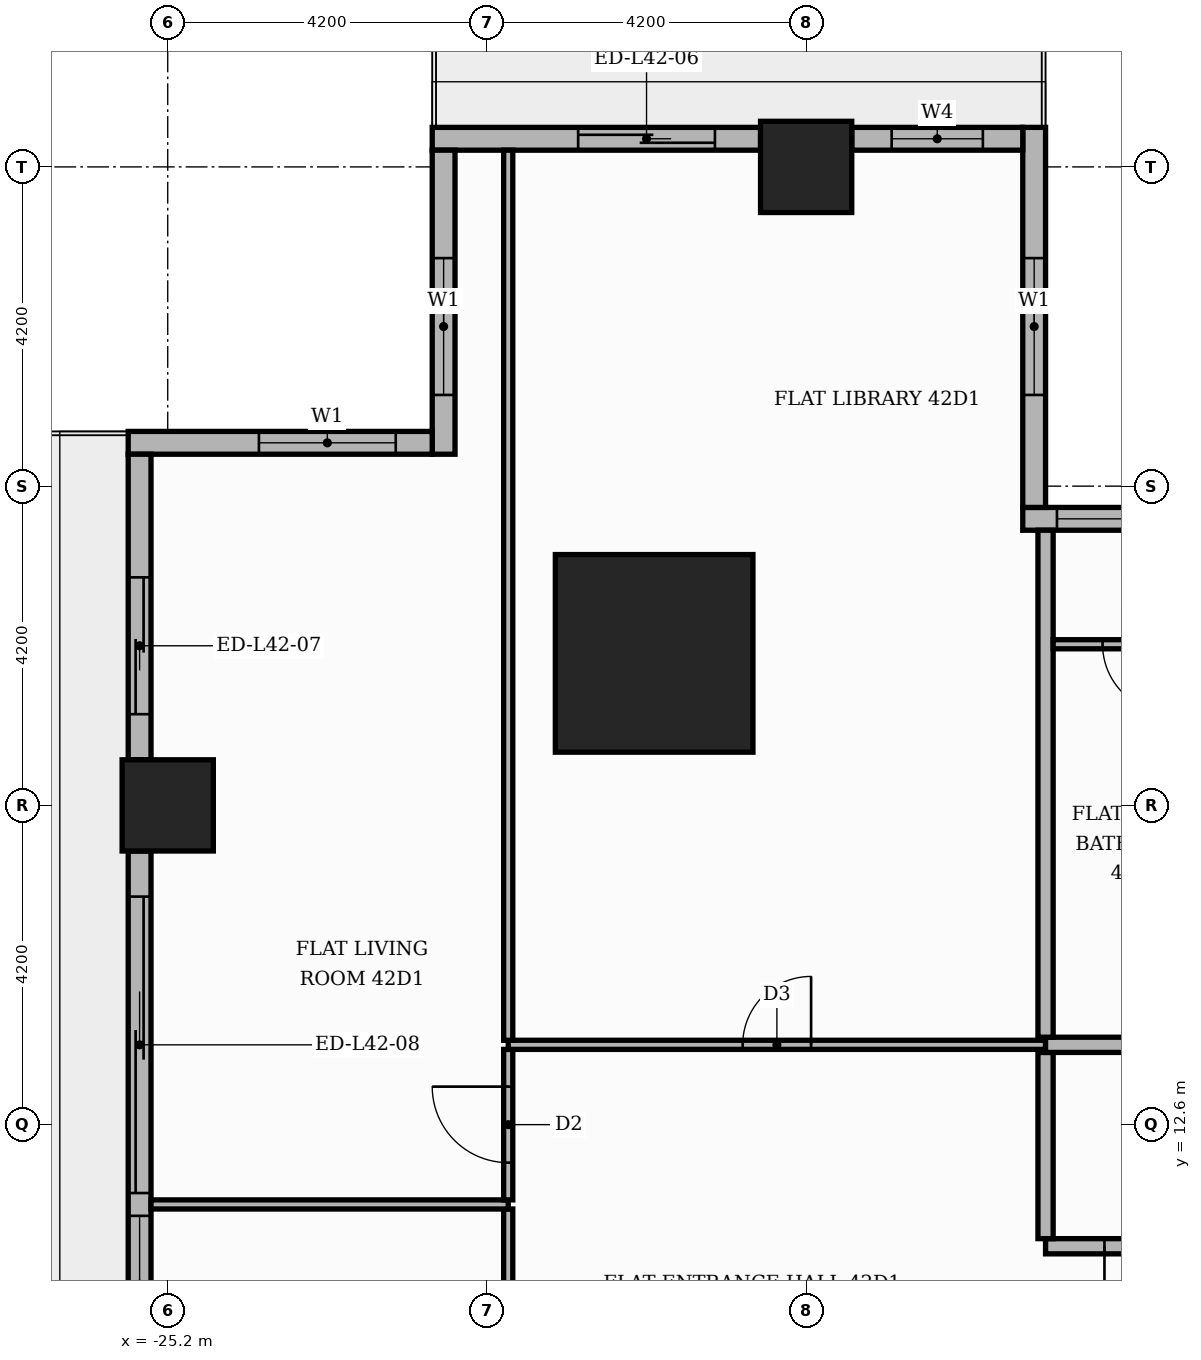
"""IFC4 building model, lengths in metres.
Left out: names, types, materials, properties, quantities, classifications, styles, units other than length and angle.
Written with IfcOpenShell. Run it as: python <this file> out.ifc"""

import sys

from ifc_helpers import new_model, si_unit, direction, frame, frame_2d, origin, origin_2d, place, context, subcontext, project, spatial, rectangle, extrude, element, fill, save


model = new_model("IFC4")
c1 = context("Model", 3, precision=1e-05, world=origin(), true_north=direction((0.0, 1.0)))
c2 = subcontext(c1, "Body", "Model", "MODEL_VIEW")
j1 = project(units=[si_unit("LENGTHUNIT", "METRE"), si_unit("PLANEANGLEUNIT", "RADIAN")], contexts=[c1])
p1 = place(None, origin())
s1 = spatial("IfcSite", under=j1, at=p1, CompositionType="ELEMENT")
p2 = place(p1, origin())
s2 = spatial("IfcBuilding", under=s1, at=p2, CompositionType="ELEMENT")
p3 = place(p2, frame((0.0, 0.0, 176.7)))
s3 = spatial("IfcBuildingStorey", under=s2, at=p3, CompositionType="ELEMENT", Elevation=176.7)
p4 = place(p3, frame((-18.8, 18.8, 0.0), z_axis=(0.0, 0.0, 1.0), x_axis=(1.0, 0.0, 0.0)))
e1 = element("IfcColumn", 1, at=p4, inside=s3, PredefinedType="COLUMN", context=c2, shape_type="SweptSolid", body=[
    extrude(rectangle(XDim=2.6, YDim=2.6, at=origin_2d()), origin(), (0.0, 0.0, 1.0), 3.9),
])
for number, where, z_axis, x_axis in (
    (2, (-16.8, 25.2, 0.0), (0.0, 0.0, 1.0), (1.0, 0.0, 0.0)),
    (3, (-25.2, 16.8, 0.0), (0.0, 0.0, 1.0), (1.0, 0.0, 0.0)),
):
    element("IfcColumn", number, at=place(p3, frame(where, z_axis=z_axis, x_axis=x_axis)), inside=s3, PredefinedType="COLUMN", context=c2, shape_type="SweptSolid", body=[
        extrude(rectangle(XDim=1.2, YDim=1.2, at=origin_2d()), origin(), (0.0, 0.0, 1.0), 3.9),
    ])
p5 = place(p3, frame((13.65, 20.57, 0.0), z_axis=(0.0, 0.0, 1.0), x_axis=(-1.0, 0.0, 0.0)))
e4 = element("IfcWall", 4, at=p5, inside=s3, PredefinedType="STANDARD", context=c2, shape_type="SweptSolid", body=[
    extrude(rectangle(XDim=27.6, YDim=0.3, at=frame_2d((13.8, 0.0))), origin(), (0.0, 0.0, 1.0), 3.4),
])
p6 = place(p5, frame((0.15, 0.0, 0.9)))
e5 = element("IfcOpeningElement", 5, at=p6, cuts=e4, PredefinedType="OPENING", context=c2, shape_type="SweptSolid", body=[
    extrude(rectangle(XDim=1.8, YDim=2.1, at=frame_2d((0.9, 1.05))), frame((0.0, 0.16, 0.0), z_axis=(0.0, -1.0, 0.0), x_axis=(1.0, 0.0, 0.0)), (0.0, 0.0, 1.0), 0.32),
])
p7 = place(p5, frame((2.25, 0.0, 0.9)))
e6 = element("IfcOpeningElement", 6, at=p7, cuts=e4, PredefinedType="OPENING", context=c2, shape_type="SweptSolid", body=[
    extrude(rectangle(XDim=6.0, YDim=2.1, at=frame_2d((3.0, 1.05))), frame((0.0, 0.16, 0.0), z_axis=(0.0, -1.0, 0.0), x_axis=(1.0, 0.0, 0.0)), (0.0, 0.0, 1.0), 0.32),
])
p8 = place(p5, frame((8.55, 0.0, 0.9)))
e7 = element("IfcOpeningElement", 7, at=p8, cuts=e4, PredefinedType="OPENING", context=c2, shape_type="SweptSolid", body=[
    extrude(rectangle(XDim=6.0, YDim=2.1, at=frame_2d((3.0, 1.05))), frame((0.0, 0.16, 0.0), z_axis=(0.0, -1.0, 0.0), x_axis=(1.0, 0.0, 0.0)), (0.0, 0.0, 1.0), 0.32),
])
p9 = place(p5, frame((14.85, 0.0, 0.9)))
e8 = element("IfcOpeningElement", 8, at=p9, cuts=e4, PredefinedType="OPENING", context=c2, shape_type="SweptSolid", body=[
    extrude(rectangle(XDim=6.0, YDim=2.1, at=frame_2d((3.0, 1.05))), frame((0.0, 0.16, 0.0), z_axis=(0.0, -1.0, 0.0), x_axis=(1.0, 0.0, 0.0)), (0.0, 0.0, 1.0), 0.32),
])
p10 = place(p5, frame((21.15, 0.0, 0.9)))
e9 = element("IfcOpeningElement", 9, at=p10, cuts=e4, PredefinedType="OPENING", context=c2, shape_type="SweptSolid", body=[
    extrude(rectangle(XDim=6.0, YDim=2.1, at=frame_2d((3.0, 1.05))), frame((0.0, 0.16, 0.0), z_axis=(0.0, -1.0, 0.0), x_axis=(1.0, 0.0, 0.0)), (0.0, 0.0, 1.0), 0.32),
])
p11 = place(p3, frame((-13.8, 20.72, 0.0), z_axis=(0.0, 0.0, 1.0), x_axis=(0.0, 1.0, 0.0)))
e10 = element("IfcWall", 10, at=p11, inside=s3, PredefinedType="STANDARD", context=c2, shape_type="SweptSolid", body=[
    extrude(rectangle(XDim=5.0, YDim=0.3, at=frame_2d((2.5, 0.0))), origin(), (0.0, 0.0, 1.0), 3.4),
])
p12 = place(p11, frame((1.48, 0.0, 0.9)))
e11 = element("IfcOpeningElement", 11, at=p12, cuts=e10, PredefinedType="OPENING", context=c2, shape_type="SweptSolid", body=[
    extrude(rectangle(XDim=1.8, YDim=2.1, at=frame_2d((0.9, 1.05))), frame((0.0, 0.16, 0.0), z_axis=(0.0, -1.0, 0.0), x_axis=(1.0, 0.0, 0.0)), (0.0, 0.0, 1.0), 0.32),
])
p13 = place(p3, frame((-13.95, 25.57, 0.0), z_axis=(0.0, 0.0, 1.0), x_axis=(-1.0, 0.0, 0.0)))
e12 = element("IfcWall", 12, at=p13, inside=s3, PredefinedType="STANDARD", context=c2, shape_type="SweptSolid", body=[
    extrude(rectangle(XDim=2.25, YDim=0.3, at=frame_2d((1.125, 0.0))), origin(), (0.0, 0.0, 1.0), 3.4),
])
p14 = place(p13, frame((0.525, 0.0, 0.9)))
e13 = element("IfcOpeningElement", 13, at=p14, cuts=e12, PredefinedType="OPENING", context=c2, shape_type="SweptSolid", body=[
    extrude(rectangle(XDim=1.2, YDim=2.1, at=frame_2d((0.6, 1.05))), frame((0.0, 0.16, 0.0), z_axis=(0.0, -1.0, 0.0), x_axis=(1.0, 0.0, 0.0)), (0.0, 0.0, 1.0), 0.32),
])
p15 = place(p3, frame((-17.4, 25.57, 0.0), z_axis=(0.0, 0.0, 1.0), x_axis=(-1.0, 0.0, 0.0)))
e14 = element("IfcWall", 14, at=p15, inside=s3, PredefinedType="STANDARD", context=c2, shape_type="SweptSolid", body=[
    extrude(rectangle(XDim=4.32, YDim=0.3, at=frame_2d((2.16, 0.0))), origin(), (0.0, 0.0, 1.0), 3.4),
])
p16 = place(p15, frame((0.6, 0.0, 0.0)))
e15 = element("IfcOpeningElement", 15, at=p16, cuts=e14, PredefinedType="OPENING", context=c2, shape_type="SweptSolid", body=[
    extrude(rectangle(XDim=1.8, YDim=2.4, at=frame_2d((0.9, 1.2))), frame((0.0, 0.16, 0.0), z_axis=(0.0, -1.0, 0.0), x_axis=(1.0, 0.0, 0.0)), (0.0, 0.0, 1.0), 0.32),
])
p17 = place(p3, frame((-21.57, 25.42, 0.0), z_axis=(0.0, 0.0, 1.0), x_axis=(0.0, -1.0, 0.0)))
e16 = element("IfcWall", 16, at=p17, inside=s3, PredefinedType="STANDARD", context=c2, shape_type="SweptSolid", body=[
    extrude(rectangle(XDim=4.0, YDim=0.3, at=frame_2d((2.0, 0.0))), origin(), (0.0, 0.0, 1.0), 3.4),
])
p18 = place(p17, frame((1.42, 0.0, 0.9)))
e17 = element("IfcOpeningElement", 17, at=p18, cuts=e16, PredefinedType="OPENING", context=c2, shape_type="SweptSolid", body=[
    extrude(rectangle(XDim=1.8, YDim=2.1, at=frame_2d((0.9, 1.05))), frame((0.0, 0.16, 0.0), z_axis=(0.0, -1.0, 0.0), x_axis=(1.0, 0.0, 0.0)), (0.0, 0.0, 1.0), 0.32),
])
p19 = place(p3, frame((-21.72, 21.57, 0.0), z_axis=(0.0, 0.0, 1.0), x_axis=(-1.0, 0.0, 0.0)))
e18 = element("IfcWall", 18, at=p19, inside=s3, PredefinedType="STANDARD", context=c2, shape_type="SweptSolid", body=[
    extrude(rectangle(XDim=4.0, YDim=0.3, at=frame_2d((2.0, 0.0))), origin(), (0.0, 0.0, 1.0), 3.4),
])
p20 = place(p19, frame((0.48, 0.0, 0.9)))
e19 = element("IfcOpeningElement", 19, at=p20, cuts=e18, PredefinedType="OPENING", context=c2, shape_type="SweptSolid", body=[
    extrude(rectangle(XDim=1.8, YDim=2.1, at=frame_2d((0.9, 1.05))), frame((0.0, 0.16, 0.0), z_axis=(0.0, -1.0, 0.0), x_axis=(1.0, 0.0, 0.0)), (0.0, 0.0, 1.0), 0.32),
])
p21 = place(p3, frame((-25.57, 21.42, 0.0), z_axis=(0.0, 0.0, 1.0), x_axis=(0.0, -1.0, 0.0)))
e20 = element("IfcWall", 20, at=p21, inside=s3, PredefinedType="STANDARD", context=c2, shape_type="SweptSolid", body=[
    extrude(rectangle(XDim=4.02, YDim=0.3, at=frame_2d((2.01, 0.0))), origin(), (0.0, 0.0, 1.0), 3.4),
])
p22 = place(p21, frame((1.62, 0.0, 0.0)))
e21 = element("IfcOpeningElement", 21, at=p22, cuts=e20, PredefinedType="OPENING", context=c2, shape_type="SweptSolid", body=[
    extrude(rectangle(XDim=1.8, YDim=2.4, at=frame_2d((0.9, 1.2))), frame((0.0, 0.16, 0.0), z_axis=(0.0, -1.0, 0.0), x_axis=(1.0, 0.0, 0.0)), (0.0, 0.0, 1.0), 0.32),
])
p23 = place(p3, frame((-25.57, 16.2, 0.0), z_axis=(0.0, 0.0, 1.0), x_axis=(0.0, -1.0, 0.0)))
e22 = element("IfcWall", 22, at=p23, inside=s3, PredefinedType="STANDARD", context=c2, shape_type="SweptSolid", body=[
    extrude(rectangle(XDim=7.2, YDim=0.3, at=frame_2d((3.6, 0.0))), origin(), (0.0, 0.0, 1.0), 3.4),
])
p24 = place(p23, frame((0.6, 0.0, 0.0)))
e23 = element("IfcOpeningElement", 23, at=p24, cuts=e22, PredefinedType="OPENING", context=c2, shape_type="SweptSolid", body=[
    extrude(rectangle(XDim=3.9, YDim=2.4, at=frame_2d((1.95, 1.2))), frame((0.0, 0.16, 0.0), z_axis=(0.0, -1.0, 0.0), x_axis=(1.0, 0.0, 0.0)), (0.0, 0.0, 1.0), 0.32),
])
p25 = place(p23, frame((4.8, 0.0, 0.9)))
e24 = element("IfcOpeningElement", 24, at=p25, cuts=e22, PredefinedType="OPENING", context=c2, shape_type="SweptSolid", body=[
    extrude(rectangle(XDim=1.8, YDim=2.1, at=frame_2d((0.9, 1.05))), frame((0.0, 0.16, 0.0), z_axis=(0.0, -1.0, 0.0), x_axis=(1.0, 0.0, 0.0)), (0.0, 0.0, 1.0), 0.32),
])
p26 = place(p3, frame((-20.72, 7.41, 0.0), z_axis=(0.0, 0.0, 1.0), x_axis=(0.0, 1.0, 0.0)))
e25 = element("IfcWall", 25, at=p26, inside=s3, PredefinedType="PARTITIONING", context=c2, shape_type="SweptSolid", body=[
    extrude(rectangle(XDim=4.08, YDim=0.12, at=frame_2d((2.04, 0.0))), origin(), (0.0, 0.0, 1.0), 3.4),
])
p27 = place(p26, frame((1.59, 0.0, 0.0)))
e26 = element("IfcOpeningElement", 26, at=p27, cuts=e25, PredefinedType="OPENING", context=c2, shape_type="SweptSolid", body=[
    extrude(rectangle(XDim=0.9, YDim=2.1, at=frame_2d((0.45, 1.05))), frame((0.0, 0.07, 0.0), z_axis=(0.0, -1.0, 0.0), x_axis=(1.0, 0.0, 0.0)), (0.0, 0.0, 1.0), 0.14),
])
p28 = place(p3, frame((-13.65, 11.0, 0.0), z_axis=(0.0, 0.0, 1.0), x_axis=(1.0, 0.0, 0.0)))
e27 = element("IfcWall", 27, at=p28, inside=s3, PredefinedType="PARTITIONING", context=c2, shape_type="SweptSolid", body=[
    extrude(rectangle(XDim=2.65, YDim=0.2, at=frame_2d((1.325, 0.0))), origin(), (0.0, 0.0, 1.0), 3.4),
])
p29 = place(p28, frame((0.775, 0.0, 0.0)))
e28 = element("IfcOpeningElement", 28, at=p29, cuts=e27, PredefinedType="OPENING", context=c2, shape_type="SweptSolid", body=[
    extrude(rectangle(XDim=1.1, YDim=2.4, at=frame_2d((0.55, 1.2))), frame((0.0, 0.11, 0.0), z_axis=(0.0, -1.0, 0.0), x_axis=(1.0, 0.0, 0.0)), (0.0, 0.0, 1.0), 0.22),
])
p30 = place(p3, frame((-13.65, 11.1, 0.0), z_axis=(0.0, 0.0, 1.0), x_axis=(0.0, 1.0, 0.0)))
e29 = element("IfcWall", 29, at=p30, inside=s3, PredefinedType="PARTITIONING", context=c2, shape_type="SweptSolid", body=[
    extrude(rectangle(XDim=2.45, YDim=0.2, at=frame_2d((1.225, 0.0))), origin(), (0.0, 0.0, 1.0), 3.4),
])
p31 = place(p3, frame((-25.42, 11.55, 0.0), z_axis=(0.0, 0.0, 1.0), x_axis=(1.0, 0.0, 0.0)))
e30 = element("IfcWall", 30, at=p31, inside=s3, PredefinedType="PARTITIONING", context=c2, shape_type="SweptSolid", body=[
    extrude(rectangle(XDim=4.7, YDim=0.12, at=frame_2d((2.35, 0.0))), origin(), (0.0, 0.0, 1.0), 3.4),
])
p32 = place(p3, frame((-20.72, 11.61, 0.0), z_axis=(0.0, 0.0, 1.0), x_axis=(0.0, 1.0, 0.0)))
e31 = element("IfcWall", 31, at=p32, inside=s3, PredefinedType="PARTITIONING", context=c2, shape_type="SweptSolid", body=[
    extrude(rectangle(XDim=1.98, YDim=0.12, at=frame_2d((0.99, 0.0))), origin(), (0.0, 0.0, 1.0), 3.4),
])
p33 = place(p32, frame((0.49, 0.0, 0.0)))
e32 = element("IfcOpeningElement", 32, at=p33, cuts=e31, PredefinedType="OPENING", context=c2, shape_type="SweptSolid", body=[
    extrude(rectangle(XDim=1.0, YDim=2.1, at=frame_2d((0.5, 1.05))), frame((0.0, 0.07, 0.0), z_axis=(0.0, -1.0, 0.0), x_axis=(1.0, 0.0, 0.0)), (0.0, 0.0, 1.0), 0.14),
])
p34 = place(p3, frame((-20.72, 13.65, 0.0), z_axis=(0.0, 0.0, 1.0), x_axis=(1.0, 0.0, 0.0)))
e33 = element("IfcWall", 33, at=p34, inside=s3, PredefinedType="PARTITIONING", context=c2, shape_type="SweptSolid", body=[
    extrude(rectangle(XDim=7.07, YDim=0.12, at=frame_2d((3.535, 0.0))), origin(), (0.0, 0.0, 1.0), 3.4),
])
p35 = place(p34, frame((3.085, 0.0, 0.0)))
e34 = element("IfcOpeningElement", 34, at=p35, cuts=e33, PredefinedType="OPENING", context=c2, shape_type="SweptSolid", body=[
    extrude(rectangle(XDim=0.9, YDim=2.1, at=frame_2d((0.45, 1.05))), frame((0.0, 0.07, 0.0), z_axis=(0.0, -1.0, 0.0), x_axis=(1.0, 0.0, 0.0)), (0.0, 0.0, 1.0), 0.14),
])
p36 = place(p3, frame((-13.65, 13.65, 0.0), z_axis=(0.0, 0.0, 1.0), x_axis=(1.0, 0.0, 0.0)))
e35 = element("IfcWall", 35, at=p36, inside=s3, PredefinedType="PARTITIONING", context=c2, shape_type="SweptSolid", body=[
    extrude(rectangle(XDim=39.07, YDim=0.2, at=frame_2d((19.535, 0.0))), origin(), (0.0, 0.0, 1.0), 3.4),
])
p37 = place(p36, frame((23.6, 0.0, 0.0)))
e36 = element("IfcOpeningElement", 36, at=p37, cuts=e35, PredefinedType="OPENING", context=c2, shape_type="SweptSolid", body=[
    extrude(rectangle(XDim=1.1, YDim=2.4, at=frame_2d((0.55, 1.2))), frame((0.0, 0.11, 0.0), z_axis=(0.0, -1.0, 0.0), x_axis=(1.0, 0.0, 0.0)), (0.0, 0.0, 1.0), 0.22),
])
p38 = place(p3, frame((-20.72, 13.71, 0.0), z_axis=(0.0, 0.0, 1.0), x_axis=(0.0, 1.0, 0.0)))
e37 = element("IfcWall", 37, at=p38, inside=s3, PredefinedType="PARTITIONING", context=c2, shape_type="SweptSolid", body=[
    extrude(rectangle(XDim=11.71, YDim=0.12, at=frame_2d((5.855, 0.0))), origin(), (0.0, 0.0, 1.0), 3.4),
])
p39 = place(p3, frame((-13.65, 13.75, 0.0), z_axis=(0.0, 0.0, 1.0), x_axis=(0.0, 1.0, 0.0)))
e38 = element("IfcWall", 38, at=p39, inside=s3, PredefinedType="PARTITIONING", context=c2, shape_type="SweptSolid", body=[
    extrude(rectangle(XDim=6.67, YDim=0.2, at=frame_2d((3.335, 0.0))), origin(), (0.0, 0.0, 1.0), 3.4),
])
p40 = place(p3, frame((-13.55, 18.92, 0.0), z_axis=(0.0, 0.0, 1.0), x_axis=(1.0, 0.0, 0.0)))
e39 = element("IfcWall", 39, at=p40, inside=s3, PredefinedType="PARTITIONING", context=c2, shape_type="SweptSolid", body=[
    extrude(rectangle(XDim=20.9, YDim=0.12, at=frame_2d((10.45, 0.0))), origin(), (0.0, 0.0, 1.0), 3.4),
])
p41 = place(p40, frame((17.15, 0.0, 0.0)))
e40 = element("IfcOpeningElement", 40, at=p41, cuts=e39, PredefinedType="OPENING", context=c2, shape_type="SweptSolid", body=[
    extrude(rectangle(XDim=0.9, YDim=2.1, at=frame_2d((0.45, 1.05))), frame((0.0, 0.07, 0.0), z_axis=(0.0, -1.0, 0.0), x_axis=(1.0, 0.0, 0.0)), (0.0, 0.0, 1.0), 0.14),
])
p42 = place(p40, frame((12.2, 0.0, 0.0)))
e41 = element("IfcOpeningElement", 41, at=p42, cuts=e39, PredefinedType="OPENING", context=c2, shape_type="SweptSolid", body=[
    extrude(rectangle(XDim=0.9, YDim=2.1, at=frame_2d((0.45, 1.05))), frame((0.0, 0.07, 0.0), z_axis=(0.0, -1.0, 0.0), x_axis=(1.0, 0.0, 0.0)), (0.0, 0.0, 1.0), 0.14),
])
p43 = place(p40, frame((7.1, 0.0, 0.0)))
e42 = element("IfcOpeningElement", 42, at=p43, cuts=e39, PredefinedType="OPENING", context=c2, shape_type="SweptSolid", body=[
    extrude(rectangle(XDim=0.9, YDim=2.1, at=frame_2d((0.45, 1.05))), frame((0.0, 0.07, 0.0), z_axis=(0.0, -1.0, 0.0), x_axis=(1.0, 0.0, 0.0)), (0.0, 0.0, 1.0), 0.14),
])
p44 = place(p40, frame((2.75, 0.0, 0.0)))
e43 = element("IfcOpeningElement", 43, at=p44, cuts=e39, PredefinedType="OPENING", context=c2, shape_type="SweptSolid", body=[
    extrude(rectangle(XDim=0.9, YDim=2.1, at=frame_2d((0.45, 1.05))), frame((0.0, 0.07, 0.0), z_axis=(0.0, -1.0, 0.0), x_axis=(1.0, 0.0, 0.0)), (0.0, 0.0, 1.0), 0.14),
])
p45 = place(p40, frame((0.65, 0.0, 0.0)))
e44 = element("IfcOpeningElement", 44, at=p45, cuts=e39, PredefinedType="OPENING", context=c2, shape_type="SweptSolid", body=[
    extrude(rectangle(XDim=0.9, YDim=2.1, at=frame_2d((0.45, 1.05))), frame((0.0, 0.07, 0.0), z_axis=(0.0, -1.0, 0.0), x_axis=(1.0, 0.0, 0.0)), (0.0, 0.0, 1.0), 0.14),
])
p46 = place(p10, origin())
e45 = element("IfcWindow", 45, at=p46, inside=s3, PartitioningType="SINGLE_PANEL", PredefinedType="WINDOW", context=c2, shape_type="SweptSolid", body=[
    extrude(rectangle(XDim=6.0, YDim=2.1, at=frame_2d((3.0, 1.05))), frame((0.0, 0.03, 0.0), z_axis=(0.0, -1.0, 0.0), x_axis=(1.0, 0.0, 0.0)), (0.0, 0.0, 1.0), 0.06),
])
fill(e9, e45)
p47 = place(p12, origin())
e46 = element("IfcWindow", 46, at=p47, inside=s3, PartitioningType="SINGLE_PANEL", PredefinedType="WINDOW", context=c2, shape_type="SweptSolid", body=[
    extrude(rectangle(XDim=1.8, YDim=2.1, at=frame_2d((0.9, 1.05))), frame((0.0, 0.03, 0.0), z_axis=(0.0, -1.0, 0.0), x_axis=(1.0, 0.0, 0.0)), (0.0, 0.0, 1.0), 0.06),
])
fill(e11, e46)
p48 = place(p14, origin())
e47 = element("IfcWindow", 47, at=p48, inside=s3, PartitioningType="SINGLE_PANEL", PredefinedType="WINDOW", context=c2, shape_type="SweptSolid", body=[
    extrude(rectangle(XDim=1.2, YDim=2.1, at=frame_2d((0.6, 1.05))), frame((0.0, 0.03, 0.0), z_axis=(0.0, -1.0, 0.0), x_axis=(1.0, 0.0, 0.0)), (0.0, 0.0, 1.0), 0.06),
])
fill(e13, e47)
p49 = place(p16, origin())
e48 = element("IfcDoor", 48, at=p49, inside=s3, OperationType="SLIDING_TO_LEFT", PredefinedType="DOOR", context=c2, shape_type="SweptSolid", body=[
    extrude(rectangle(XDim=1.8, YDim=2.4, at=frame_2d((0.9, 1.2))), frame((0.0, 0.025, 0.0), z_axis=(0.0, -1.0, 0.0), x_axis=(1.0, 0.0, 0.0)), (0.0, 0.0, 1.0), 0.05),
])
fill(e15, e48)
p50 = place(p18, origin())
e49 = element("IfcWindow", 49, at=p50, inside=s3, PartitioningType="SINGLE_PANEL", PredefinedType="WINDOW", context=c2, shape_type="SweptSolid", body=[
    extrude(rectangle(XDim=1.8, YDim=2.1, at=frame_2d((0.9, 1.05))), frame((0.0, 0.03, 0.0), z_axis=(0.0, -1.0, 0.0), x_axis=(1.0, 0.0, 0.0)), (0.0, 0.0, 1.0), 0.06),
])
fill(e17, e49)
p51 = place(p20, origin())
e50 = element("IfcWindow", 50, at=p51, inside=s3, PartitioningType="SINGLE_PANEL", PredefinedType="WINDOW", context=c2, shape_type="SweptSolid", body=[
    extrude(rectangle(XDim=1.8, YDim=2.1, at=frame_2d((0.9, 1.05))), frame((0.0, 0.03, 0.0), z_axis=(0.0, -1.0, 0.0), x_axis=(1.0, 0.0, 0.0)), (0.0, 0.0, 1.0), 0.06),
])
fill(e19, e50)
p52 = place(p22, origin())
e51 = element("IfcDoor", 51, at=p52, inside=s3, OperationType="SLIDING_TO_RIGHT", PredefinedType="DOOR", context=c2, shape_type="SweptSolid", body=[
    extrude(rectangle(XDim=1.8, YDim=2.4, at=frame_2d((0.9, 1.2))), frame((0.0, 0.025, 0.0), z_axis=(0.0, -1.0, 0.0), x_axis=(1.0, 0.0, 0.0)), (0.0, 0.0, 1.0), 0.05),
])
fill(e21, e51)
p53 = place(p24, origin())
e52 = element("IfcDoor", 52, at=p53, inside=s3, OperationType="SLIDING_TO_LEFT", PredefinedType="DOOR", context=c2, shape_type="SweptSolid", body=[
    extrude(rectangle(XDim=3.9, YDim=2.4, at=frame_2d((1.95, 1.2))), frame((0.0, 0.025, 0.0), z_axis=(0.0, -1.0, 0.0), x_axis=(1.0, 0.0, 0.0)), (0.0, 0.0, 1.0), 0.05),
])
fill(e23, e52)
p54 = place(p25, origin())
e53 = element("IfcWindow", 53, at=p54, inside=s3, PartitioningType="SINGLE_PANEL", PredefinedType="WINDOW", context=c2, shape_type="SweptSolid", body=[
    extrude(rectangle(XDim=1.8, YDim=2.1, at=frame_2d((0.9, 1.05))), frame((0.0, 0.03, 0.0), z_axis=(0.0, -1.0, 0.0), x_axis=(1.0, 0.0, 0.0)), (0.0, 0.0, 1.0), 0.06),
])
fill(e24, e53)
p55 = place(p45, frame((0.9, 0.0, 0.0), z_axis=(0.0, 0.0, 1.0), x_axis=(-1.0, 0.0, 0.0)))
e54 = element("IfcDoor", 54, at=p55, inside=s3, OperationType="SINGLE_SWING_RIGHT", PredefinedType="DOOR", context=c2, shape_type="SweptSolid", body=[
    extrude(rectangle(XDim=0.9, YDim=2.1, at=frame_2d((0.45, 1.05))), frame((0.0, 0.025, 0.0), z_axis=(0.0, -1.0, 0.0), x_axis=(1.0, 0.0, 0.0)), (0.0, 0.0, 1.0), 0.05),
])
fill(e44, e54)
p56 = place(p29, frame((1.1, 0.0, 0.0), z_axis=(0.0, 0.0, 1.0), x_axis=(-1.0, 0.0, 0.0)))
e55 = element("IfcDoor", 55, at=p56, inside=s3, OperationType="SINGLE_SWING_LEFT", PredefinedType="DOOR", context=c2, shape_type="SweptSolid", body=[
    extrude(rectangle(XDim=1.1, YDim=2.4, at=frame_2d((0.55, 1.2))), frame((0.0, 0.025, 0.0), z_axis=(0.0, -1.0, 0.0), x_axis=(1.0, 0.0, 0.0)), (0.0, 0.0, 1.0), 0.05),
])
fill(e28, e55)
p57 = place(p35, origin())
e56 = element("IfcDoor", 56, at=p57, inside=s3, OperationType="SINGLE_SWING_RIGHT", PredefinedType="DOOR", context=c2, shape_type="SweptSolid", body=[
    extrude(rectangle(XDim=0.9, YDim=2.1, at=frame_2d((0.45, 1.05))), frame((0.0, 0.025, 0.0), z_axis=(0.0, -1.0, 0.0), x_axis=(1.0, 0.0, 0.0)), (0.0, 0.0, 1.0), 0.05),
])
fill(e34, e56)
p58 = place(p33, origin())
e57 = element("IfcDoor", 57, at=p58, inside=s3, OperationType="SINGLE_SWING_RIGHT", PredefinedType="DOOR", context=c2, shape_type="SweptSolid", body=[
    extrude(rectangle(XDim=1.0, YDim=2.1, at=frame_2d((0.5, 1.05))), frame((0.0, 0.025, 0.0), z_axis=(0.0, -1.0, 0.0), x_axis=(1.0, 0.0, 0.0)), (0.0, 0.0, 1.0), 0.05),
])
fill(e32, e57)
save(model, sys.argv[1])
